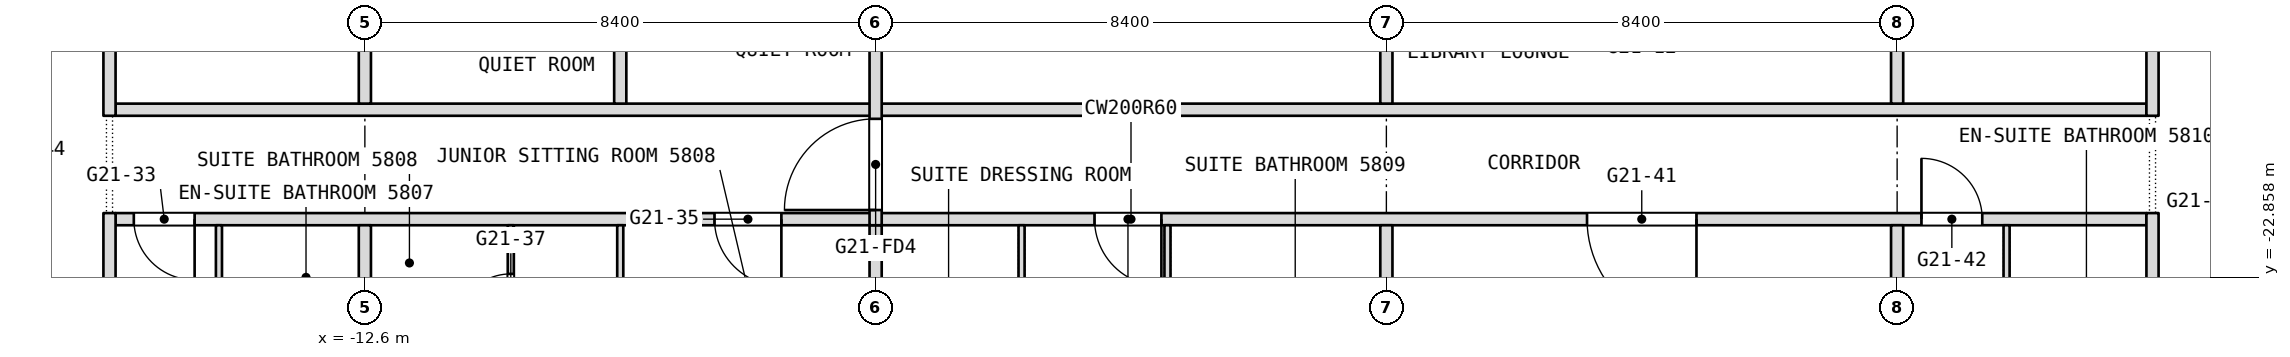
"""IFC4 building model, lengths in metres.
Left out: names, types, materials, properties, quantities, classifications, styles, units other than length and angle.
Written with IfcOpenShell. Run it as: python <this file> out.ifc"""

import sys

from ifc_helpers import new_model, si_unit, direction, frame, frame_2d, origin, place, context, subcontext, project, spatial, rectangle, extrude, element, fill, save


model = new_model("IFC4")
c1 = context("Model", 3, precision=1e-05, world=origin(), true_north=direction((0.0, 1.0)))
c2 = subcontext(c1, "Body", "Model", "MODEL_VIEW")
j1 = project(units=[si_unit("LENGTHUNIT", "METRE"), si_unit("PLANEANGLEUNIT", "RADIAN")], contexts=[c1])
p1 = place(None, origin())
s1 = spatial("IfcSite", under=j1, at=p1, CompositionType="ELEMENT")
p2 = place(p1, origin())
s2 = spatial("IfcBuilding", under=s1, at=p2, CompositionType="ELEMENT")
p3 = place(p2, frame((0.0, 0.0, 245.3)))
s3 = spatial("IfcBuildingStorey", under=s2, at=p3, CompositionType="ELEMENT", Elevation=245.3)
p4 = place(p3, frame((-16.7, -21.9, 0.0), z_axis=(0.0, 0.0, 1.0), x_axis=(1.0, 0.0, 0.0)))
e1 = element("IfcWall", 1, at=p4, inside=s3, PredefinedType="PARTITIONING", context=c2, shape_type="SweptSolid", body=[
    extrude(rectangle(XDim=33.4, YDim=0.2, at=frame_2d((16.7, 0.0))), origin(), (0.0, 0.0, 1.0), 3.34),
])
p5 = place(p4, frame((0.3, 0.0, 0.0)))
e2 = element("IfcOpeningElement", 2, at=p5, cuts=e1, PredefinedType="OPENING", context=c2, shape_type="SweptSolid", body=[
    extrude(rectangle(XDim=1.0, YDim=2.1, at=frame_2d((0.5, 1.05))), frame((0.0, 0.1, 0.0), z_axis=(0.0, -1.0, 0.0), x_axis=(1.0, 0.0, 0.0)), (0.0, 0.0, 1.0), 0.2),
])
p6 = place(p4, frame((9.85, 0.0, 0.0)))
e3 = element("IfcOpeningElement", 3, at=p6, cuts=e1, PredefinedType="OPENING", context=c2, shape_type="SweptSolid", body=[
    extrude(rectangle(XDim=1.1, YDim=2.1, at=frame_2d((0.55, 1.05))), frame((0.0, 0.1, 0.0), z_axis=(0.0, -1.0, 0.0), x_axis=(1.0, 0.0, 0.0)), (0.0, 0.0, 1.0), 0.2),
])
p7 = place(p4, frame((16.1, 0.0, 0.0)))
e4 = element("IfcOpeningElement", 4, at=p7, cuts=e1, PredefinedType="OPENING", context=c2, shape_type="SweptSolid", body=[
    extrude(rectangle(XDim=1.1, YDim=2.1, at=frame_2d((0.55, 1.05))), frame((0.0, 0.1, 0.0), z_axis=(0.0, -1.0, 0.0), x_axis=(1.0, 0.0, 0.0)), (0.0, 0.0, 1.0), 0.2),
])
p8 = place(p4, frame((24.2, 0.0, 0.0)))
e5 = element("IfcOpeningElement", 5, at=p8, cuts=e1, PredefinedType="OPENING", context=c2, shape_type="SweptSolid", body=[
    extrude(rectangle(XDim=1.8, YDim=2.1, at=frame_2d((0.9, 1.05))), frame((0.0, 0.1, 0.0), z_axis=(0.0, -1.0, 0.0), x_axis=(1.0, 0.0, 0.0)), (0.0, 0.0, 1.0), 0.2),
])
p9 = place(p4, frame((29.7, 0.0, 0.0)))
e6 = element("IfcOpeningElement", 6, at=p9, cuts=e1, PredefinedType="OPENING", context=c2, shape_type="SweptSolid", body=[
    extrude(rectangle(XDim=1.0, YDim=2.1, at=frame_2d((0.5, 1.05))), frame((0.0, 0.1, 0.0), z_axis=(0.0, -1.0, 0.0), x_axis=(1.0, 0.0, 0.0)), (0.0, 0.0, 1.0), 0.2),
])
p10 = place(p3, frame((-16.7, -20.1, 0.0), z_axis=(0.0, 0.0, 1.0), x_axis=(1.0, 0.0, 0.0)))
e7 = element("IfcWall", 7, at=p10, inside=s3, PredefinedType="PARTITIONING", context=c2, shape_type="SweptSolid", body=[
    extrude(rectangle(XDim=33.4, YDim=0.2, at=frame_2d((16.7, 0.0))), origin(), (0.0, 0.0, 1.0), 3.34),
])
p11 = place(p3, frame((16.8, -27.229, 0.0), z_axis=(0.0, 0.0, 1.0), x_axis=(0.0, 1.0, 0.0)))
e8 = element("IfcWall", 8, at=p11, inside=s3, PredefinedType="PARTITIONING", context=c2, shape_type="SweptSolid", body=[
    extrude(rectangle(XDim=5.429, YDim=0.2, at=frame_2d((2.714, 0.0))), origin(), (0.0, 0.0, 1.0), 3.34),
])
p12 = place(p3, frame((16.8, -20.2, 0.0), z_axis=(0.0, 0.0, 1.0), x_axis=(0.0, 1.0, 0.0)))
e9 = element("IfcWall", 9, at=p12, inside=s3, PredefinedType="PARTITIONING", context=c2, shape_type="SweptSolid", body=[
    extrude(rectangle(XDim=6.8, YDim=0.2, at=frame_2d((3.4, 0.0))), origin(), (0.0, 0.0, 1.0), 3.34),
])
p13 = place(p3, frame((14.4, -24.95, 0.0), z_axis=(0.0, 0.0, 1.0), x_axis=(0.0, 1.0, 0.0)))
e10 = element("IfcWall", 10, at=p13, inside=s3, PredefinedType="PARTITIONING", context=c2, shape_type="SweptSolid", body=[
    extrude(rectangle(XDim=2.95, YDim=0.1, at=frame_2d((1.475, 0.0))), origin(), (0.0, 0.0, 1.0), 3.34),
])
p14 = place(p3, frame((12.6, -28.343, 0.0), z_axis=(0.0, 0.0, 1.0), x_axis=(0.0, 1.0, 0.0)))
e11 = element("IfcWall", 11, at=p14, inside=s3, PredefinedType="PARTITIONING", context=c2, shape_type="SweptSolid", body=[
    extrude(rectangle(XDim=6.343, YDim=0.2, at=frame_2d((3.171, 0.0))), origin(), (0.0, 0.0, 1.0), 3.34),
])
p15 = place(p3, frame((12.6, -20.0, 0.0), z_axis=(0.0, 0.0, 1.0), x_axis=(0.0, 1.0, 0.0)))
e12 = element("IfcWall", 12, at=p15, inside=s3, PredefinedType="PARTITIONING", context=c2, shape_type="SweptSolid", body=[
    extrude(rectangle(XDim=1.5, YDim=0.2, at=frame_2d((0.75, 0.0))), origin(), (0.0, 0.0, 1.0), 3.34),
])
p16 = place(p3, frame((4.2, -28.9, 0.0), z_axis=(0.0, 0.0, 1.0), x_axis=(0.0, 1.0, 0.0)))
e13 = element("IfcWall", 13, at=p16, inside=s3, PredefinedType="PARTITIONING", context=c2, shape_type="SweptSolid", body=[
    extrude(rectangle(XDim=6.9, YDim=0.2, at=frame_2d((3.45, 0.0))), origin(), (0.0, 0.0, 1.0), 3.34),
])
p17 = place(p3, frame((4.2, -20.0, 0.0), z_axis=(0.0, 0.0, 1.0), x_axis=(0.0, 1.0, 0.0)))
e14 = element("IfcWall", 14, at=p17, inside=s3, PredefinedType="PARTITIONING", context=c2, shape_type="SweptSolid", body=[
    extrude(rectangle(XDim=6.4, YDim=0.2, at=frame_2d((3.2, 0.0))), origin(), (0.0, 0.0, 1.0), 3.34),
])
p18 = place(p3, frame((0.6, -25.55, 0.0), z_axis=(0.0, 0.0, 1.0), x_axis=(0.0, 1.0, 0.0)))
e15 = element("IfcWall", 15, at=p18, inside=s3, PredefinedType="PARTITIONING", context=c2, shape_type="SweptSolid", body=[
    extrude(rectangle(XDim=3.55, YDim=0.1, at=frame_2d((1.775, 0.0))), origin(), (0.0, 0.0, 1.0), 3.34),
])
p19 = place(p3, frame((-1.8, -25.45, 0.0), z_axis=(0.0, 0.0, 1.0), x_axis=(0.0, 1.0, 0.0)))
e16 = element("IfcWall", 16, at=p19, inside=s3, PredefinedType="PARTITIONING", context=c2, shape_type="SweptSolid", body=[
    extrude(rectangle(XDim=3.45, YDim=0.1, at=frame_2d((1.725, 0.0))), origin(), (0.0, 0.0, 1.0), 3.34),
])
p20 = place(p3, frame((-4.2, -28.9, 0.0), z_axis=(0.0, 0.0, 1.0), x_axis=(0.0, 1.0, 0.0)))
e17 = element("IfcWall", 17, at=p20, inside=s3, PredefinedType="PARTITIONING", context=c2, shape_type="SweptSolid", body=[
    extrude(rectangle(XDim=6.9, YDim=0.2, at=frame_2d((3.45, 0.0))), origin(), (0.0, 0.0, 1.0), 3.34),
])
p21 = place(p3, frame((-4.2, -22.0, 0.0), z_axis=(0.0, 0.0, 1.0), x_axis=(0.0, 1.0, 0.0)))
e18 = element("IfcWall", 18, at=p21, inside=s3, PredefinedType="PARTITIONING", context=c2, shape_type="SweptSolid", body=[
    extrude(rectangle(XDim=8.4, YDim=0.2, at=frame_2d((4.2, 0.0))), origin(), (0.0, 0.0, 1.0), 3.34),
])
p22 = place(p21, frame((0.25, 0.0, 0.0)))
e19 = element("IfcOpeningElement", 19, at=p22, cuts=e18, PredefinedType="OPENING", context=c2, shape_type="SweptSolid", body=[
    extrude(rectangle(XDim=1.5, YDim=2.1, at=frame_2d((0.75, 1.05))), frame((0.0, 0.1, 0.0), z_axis=(0.0, -1.0, 0.0), x_axis=(1.0, 0.0, 0.0)), (0.0, 0.0, 1.0), 0.2),
])
p23 = place(p3, frame((-8.4, -28.9, 0.0), z_axis=(0.0, 0.0, 1.0), x_axis=(0.0, 1.0, 0.0)))
e20 = element("IfcWall", 20, at=p23, inside=s3, PredefinedType="PARTITIONING", context=c2, shape_type="SweptSolid", body=[
    extrude(rectangle(XDim=6.9, YDim=0.1, at=frame_2d((3.45, 0.0))), origin(), (0.0, 0.0, 1.0), 3.34),
])
p24 = place(p23, frame((2.53, 0.0, 0.0)))
e21 = element("IfcOpeningElement", 21, at=p24, cuts=e20, PredefinedType="OPENING", context=c2, shape_type="SweptSolid", body=[
    extrude(rectangle(XDim=0.9, YDim=2.1, at=frame_2d((0.45, 1.05))), frame((0.0, 0.05, 0.0), z_axis=(0.0, -1.0, 0.0), x_axis=(1.0, 0.0, 0.0)), (0.0, 0.0, 1.0), 0.1),
])
p25 = place(p3, frame((-8.4, -20.0, 0.0), z_axis=(0.0, 0.0, 1.0), x_axis=(0.0, 1.0, 0.0)))
e22 = element("IfcWall", 22, at=p25, inside=s3, PredefinedType="PARTITIONING", context=c2, shape_type="SweptSolid", body=[
    extrude(rectangle(XDim=1.5, YDim=0.2, at=frame_2d((0.75, 0.0))), origin(), (0.0, 0.0, 1.0), 3.34),
])
p26 = place(p3, frame((-10.2, -24.55, 0.0), z_axis=(0.0, 0.0, 1.0), x_axis=(0.0, 1.0, 0.0)))
e23 = element("IfcWall", 23, at=p26, inside=s3, PredefinedType="PARTITIONING", context=c2, shape_type="SweptSolid", body=[
    extrude(rectangle(XDim=2.55, YDim=0.1, at=frame_2d((1.275, 0.0))), origin(), (0.0, 0.0, 1.0), 3.34),
])
p27 = place(p26, frame((0.85, 0.0, 0.0)))
e24 = element("IfcOpeningElement", 24, at=p27, cuts=e23, PredefinedType="OPENING", context=c2, shape_type="SweptSolid", body=[
    extrude(rectangle(XDim=0.9, YDim=2.1, at=frame_2d((0.45, 1.05))), frame((0.0, 0.05, 0.0), z_axis=(0.0, -1.0, 0.0), x_axis=(1.0, 0.0, 0.0)), (0.0, 0.0, 1.0), 0.1),
])
p28 = place(p3, frame((-12.6, -28.343, 0.0), z_axis=(0.0, 0.0, 1.0), x_axis=(0.0, 1.0, 0.0)))
e25 = element("IfcWall", 25, at=p28, inside=s3, PredefinedType="PARTITIONING", context=c2, shape_type="SweptSolid", body=[
    extrude(rectangle(XDim=6.343, YDim=0.2, at=frame_2d((3.171, 0.0))), origin(), (0.0, 0.0, 1.0), 3.34),
])
p29 = place(p3, frame((-12.6, -20.0, 0.0), z_axis=(0.0, 0.0, 1.0), x_axis=(0.0, 1.0, 0.0)))
e26 = element("IfcWall", 26, at=p29, inside=s3, PredefinedType="PARTITIONING", context=c2, shape_type="SweptSolid", body=[
    extrude(rectangle(XDim=1.5, YDim=0.2, at=frame_2d((0.75, 0.0))), origin(), (0.0, 0.0, 1.0), 3.34),
])
p30 = place(p3, frame((-15.0, -24.75, 0.0), z_axis=(0.0, 0.0, 1.0), x_axis=(0.0, 1.0, 0.0)))
e27 = element("IfcWall", 27, at=p30, inside=s3, PredefinedType="PARTITIONING", context=c2, shape_type="SweptSolid", body=[
    extrude(rectangle(XDim=2.75, YDim=0.1, at=frame_2d((1.375, 0.0))), origin(), (0.0, 0.0, 1.0), 3.34),
])
p31 = place(p3, frame((-16.8, -27.229, 0.0), z_axis=(0.0, 0.0, 1.0), x_axis=(0.0, 1.0, 0.0)))
e28 = element("IfcWall", 28, at=p31, inside=s3, PredefinedType="PARTITIONING", context=c2, shape_type="SweptSolid", body=[
    extrude(rectangle(XDim=5.429, YDim=0.2, at=frame_2d((2.714, 0.0))), origin(), (0.0, 0.0, 1.0), 3.34),
])
p32 = place(p3, frame((-16.8, -20.2, 0.0), z_axis=(0.0, 0.0, 1.0), x_axis=(0.0, 1.0, 0.0)))
e29 = element("IfcWall", 29, at=p32, inside=s3, PredefinedType="PARTITIONING", context=c2, shape_type="SweptSolid", body=[
    extrude(rectangle(XDim=6.8, YDim=0.2, at=frame_2d((3.4, 0.0))), origin(), (0.0, 0.0, 1.0), 3.34),
])
p33 = place(p5, origin())
e30 = element("IfcDoor", 30, at=p33, inside=s3, OperationType="SINGLE_SWING_RIGHT", PredefinedType="DOOR", context=c2, shape_type="SweptSolid", body=[
    extrude(rectangle(XDim=1.0, YDim=2.1, at=frame_2d((0.5, 1.05))), frame((0.0, 0.025, 0.0), z_axis=(0.0, -1.0, 0.0), x_axis=(1.0, 0.0, 0.0)), (0.0, 0.0, 1.0), 0.05),
])
fill(e2, e30)
p34 = place(p6, origin())
e31 = element("IfcDoor", 31, at=p34, inside=s3, OperationType="SINGLE_SWING_LEFT", PredefinedType="DOOR", context=c2, shape_type="SweptSolid", body=[
    extrude(rectangle(XDim=1.1, YDim=2.1, at=frame_2d((0.55, 1.05))), frame((0.0, 0.025, 0.0), z_axis=(0.0, -1.0, 0.0), x_axis=(1.0, 0.0, 0.0)), (0.0, 0.0, 1.0), 0.05),
])
fill(e3, e31)
p35 = place(p7, origin())
e32 = element("IfcDoor", 32, at=p35, inside=s3, OperationType="SINGLE_SWING_LEFT", PredefinedType="DOOR", context=c2, shape_type="SweptSolid", body=[
    extrude(rectangle(XDim=1.1, YDim=2.1, at=frame_2d((0.55, 1.05))), frame((0.0, 0.025, 0.0), z_axis=(0.0, -1.0, 0.0), x_axis=(1.0, 0.0, 0.0)), (0.0, 0.0, 1.0), 0.05),
])
fill(e4, e32)
p36 = place(p8, origin())
e33 = element("IfcDoor", 33, at=p36, inside=s3, OperationType="DOUBLE_DOOR_SINGLE_SWING", PredefinedType="DOOR", context=c2, shape_type="SweptSolid", body=[
    extrude(rectangle(XDim=1.8, YDim=2.1, at=frame_2d((0.9, 1.05))), frame((0.0, 0.025, 0.0), z_axis=(0.0, -1.0, 0.0), x_axis=(1.0, 0.0, 0.0)), (0.0, 0.0, 1.0), 0.05),
])
fill(e5, e33)
p37 = place(p9, origin())
e34 = element("IfcDoor", 34, at=p37, inside=s3, OperationType="SINGLE_SWING_RIGHT", PredefinedType="DOOR", context=c2, shape_type="SweptSolid", body=[
    extrude(rectangle(XDim=1.0, YDim=2.1, at=frame_2d((0.5, 1.05))), frame((0.0, 0.025, 0.0), z_axis=(0.0, -1.0, 0.0), x_axis=(1.0, 0.0, 0.0)), (0.0, 0.0, 1.0), 0.05),
])
fill(e6, e34)
p38 = place(p27, origin())
e35 = element("IfcDoor", 35, at=p38, inside=s3, OperationType="SINGLE_SWING_RIGHT", PredefinedType="DOOR", context=c2, shape_type="SweptSolid", body=[
    extrude(rectangle(XDim=0.9, YDim=2.1, at=frame_2d((0.45, 1.05))), frame((0.0, 0.025, 0.0), z_axis=(0.0, -1.0, 0.0), x_axis=(1.0, 0.0, 0.0)), (0.0, 0.0, 1.0), 0.05),
])
fill(e24, e35)
p39 = place(p22, origin())
e36 = element("IfcDoor", 36, at=p39, inside=s3, OperationType="DOUBLE_DOOR_DOUBLE_SWING", PredefinedType="DOOR", context=c2, shape_type="SweptSolid", body=[
    extrude(rectangle(XDim=1.5, YDim=2.1, at=frame_2d((0.75, 1.05))), frame((0.0, 0.025, 0.0), z_axis=(0.0, -1.0, 0.0), x_axis=(1.0, 0.0, 0.0)), (0.0, 0.0, 1.0), 0.05),
])
fill(e19, e36)
save(model, sys.argv[1])
